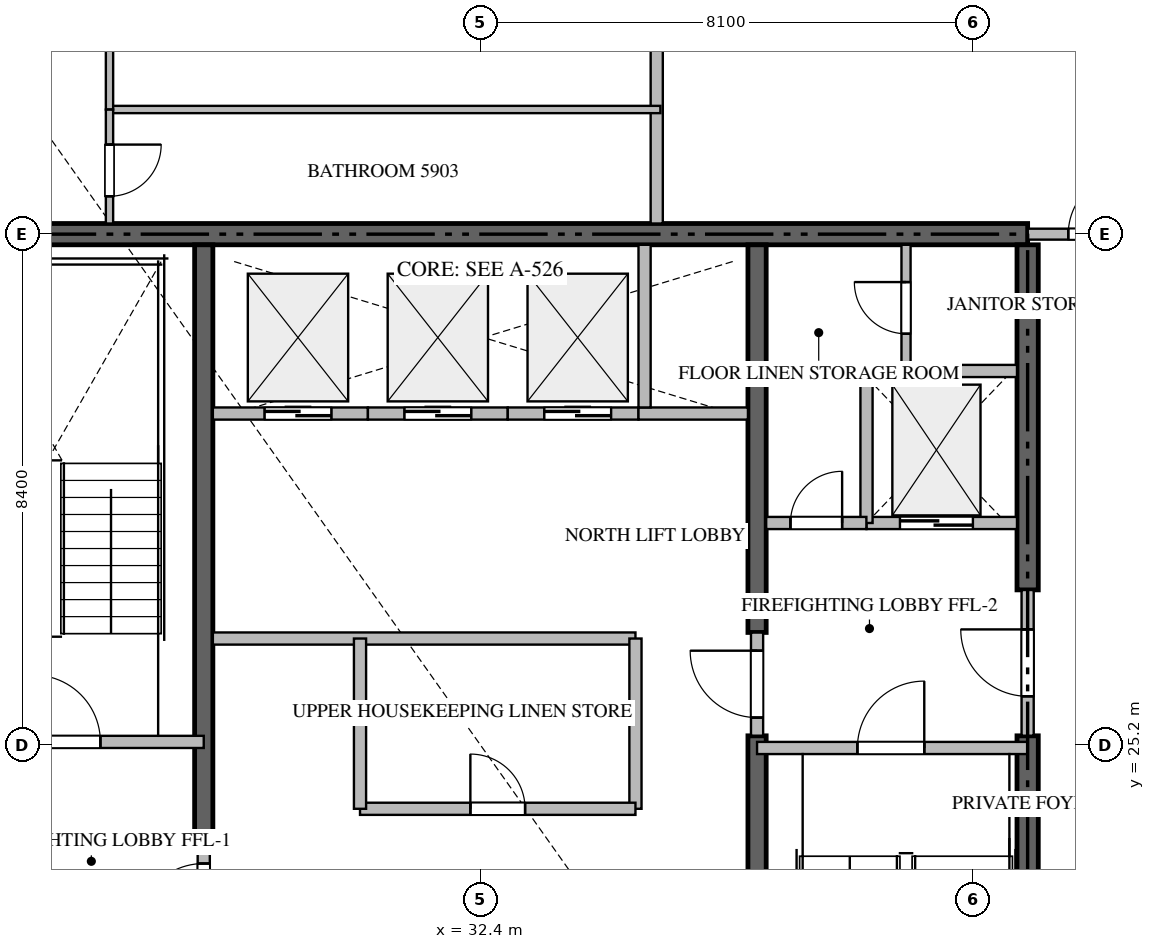
"""IFC4 building model, lengths in metres.
Left out: names, types, materials, properties, quantities, classifications, styles, units other than length and angle.
Written with IfcOpenShell. Run it as: python <this file> out.ifc"""

import sys

from ifc_helpers import new_model, si_unit, direction, frame, frame_2d, origin, place, context, subcontext, project, spatial, rectangle, extrude, source, transform, mapped, element, fill, save


model = new_model("IFC4")
c1 = context("Model", 3, precision=1e-05, world=origin(), true_north=direction((0.0, 1.0)))
c2 = subcontext(c1, "Body", "Model", "MODEL_VIEW")
j1 = project(units=[si_unit("LENGTHUNIT", "METRE"), si_unit("PLANEANGLEUNIT", "RADIAN")], contexts=[c1])
p1 = place(None, origin())
s1 = spatial("IfcSite", under=j1, at=p1, CompositionType="ELEMENT")
p2 = place(p1, origin())
s2 = spatial("IfcBuilding", under=s1, at=p2, CompositionType="ELEMENT")
p3 = place(p2, frame((0.0, 0.0, 237.4)))
s3 = spatial("IfcBuildingStorey", under=s2, at=p3, CompositionType="ELEMENT", Elevation=237.4)
p4 = place(p3, frame((41.4, 33.6, -0.26), z_axis=(0.0, 0.0, 1.0), x_axis=(-1.0, 0.0, 0.0)))
e1 = element("IfcWall", 1, at=p4, inside=s3, PredefinedType="SHEAR", context=c2, shape_type="SweptSolid", body=[
    extrude(rectangle(XDim=18.0, YDim=0.35, at=frame_2d((9.0, 0.0))), origin(), (0.0, 0.0, 1.0), 3.848),
])
p5 = place(p3, frame((41.4, 16.975, -0.26), z_axis=(0.0, 0.0, 1.0), x_axis=(0.0, 1.0, 0.0)))
e2 = element("IfcWall", 2, at=p5, inside=s3, PredefinedType="SHEAR", context=c2, shape_type="SweptSolid", body=[
    extrude(rectangle(XDim=8.375, YDim=0.35, at=frame_2d((4.188, 0.0))), origin(), (0.0, 0.0, 1.0), 3.848),
])
p6 = place(p3, frame((41.4, 27.75, -0.26), z_axis=(0.0, 0.0, 1.0), x_axis=(0.0, 1.0, 0.0)))
e3 = element("IfcWall", 3, at=p6, inside=s3, PredefinedType="SHEAR", context=c2, shape_type="SweptSolid", body=[
    extrude(rectangle(XDim=5.675, YDim=0.35, at=frame_2d((2.837, 0.0))), origin(), (0.0, 0.0, 1.0), 3.848),
])
p7 = place(p3, frame((27.85, 23.55, -0.26), z_axis=(0.0, 0.0, 1.0), x_axis=(0.0, 1.0, 0.0)))
e4 = element("IfcWall", 4, at=p7, inside=s3, PredefinedType="SHEAR", context=c2, shape_type="SweptSolid", body=[
    extrude(rectangle(XDim=9.875, YDim=0.3, at=frame_2d((4.938, 0.0))), origin(), (0.0, 0.0, 1.0), 3.848),
])
p8 = place(p3, frame((36.95, 16.975, -0.26), z_axis=(0.0, 0.0, 1.0), x_axis=(0.0, 1.0, 0.0)))
e5 = element("IfcWall", 5, at=p8, inside=s3, PredefinedType="SHEAR", context=c2, shape_type="SweptSolid", body=[
    extrude(rectangle(XDim=8.375, YDim=0.3, at=frame_2d((4.188, 0.0))), origin(), (0.0, 0.0, 1.0), 3.848),
])
p9 = place(p3, frame((36.95, 27.05, -0.26), z_axis=(0.0, 0.0, 1.0), x_axis=(0.0, 1.0, 0.0)))
e6 = element("IfcWall", 6, at=p9, inside=s3, PredefinedType="SHEAR", context=c2, shape_type="SweptSolid", body=[
    extrude(rectangle(XDim=6.375, YDim=0.3, at=frame_2d((3.188, 0.0))), origin(), (0.0, 0.0, 1.0), 3.848),
])
p10 = place(p3, frame((23.4, 25.25, 0.0), z_axis=(0.0, 0.0, 1.0), x_axis=(1.0, 0.0, 0.0)))
e7 = element("IfcWall", 7, at=p10, inside=s3, PredefinedType="STANDARD", context=c2, shape_type="SweptSolid", body=[
    extrude(rectangle(XDim=4.45, YDim=0.2, at=frame_2d((2.225, 0.0))), origin(), (0.0, 0.0, 1.0), 3.59),
])
p11 = place(p10, frame((1.65, 0.0, 0.0)))
e8 = element("IfcOpeningElement", 8, at=p11, cuts=e7, PredefinedType="OPENING", context=c2, shape_type="SweptSolid", body=[
    extrude(rectangle(XDim=1.1, YDim=2.15, at=frame_2d((0.55, 1.075))), frame((0.0, 0.11, 0.0), z_axis=(0.0, -1.0, 0.0), x_axis=(1.0, 0.0, 0.0)), (0.0, 0.0, 1.0), 0.22),
])
p12 = place(p3, frame((36.95, 25.15, 0.0), z_axis=(0.0, 0.0, 1.0), x_axis=(1.0, 0.0, 0.0)))
e9 = element("IfcWall", 9, at=p12, inside=s3, PredefinedType="STANDARD", context=c2, shape_type="SweptSolid", body=[
    extrude(rectangle(XDim=4.45, YDim=0.2, at=frame_2d((2.225, 0.0))), origin(), (0.0, 0.0, 1.0), 3.59),
])
p13 = place(p12, frame((1.65, 0.0, 0.0)))
e10 = element("IfcOpeningElement", 10, at=p13, cuts=e9, PredefinedType="OPENING", context=c2, shape_type="SweptSolid", body=[
    extrude(rectangle(XDim=1.1, YDim=2.15, at=frame_2d((0.55, 1.075))), frame((0.0, 0.11, 0.0), z_axis=(0.0, -1.0, 0.0), x_axis=(1.0, 0.0, 0.0)), (0.0, 0.0, 1.0), 0.22),
])
p14 = place(p3, frame((38.75, 28.85, 0.0), z_axis=(0.0, 0.0, 1.0), x_axis=(1.0, 0.0, 0.0)))
e11 = element("IfcWall", 11, at=p14, inside=s3, PredefinedType="STANDARD", context=c2, shape_type="SweptSolid", body=[
    extrude(rectangle(XDim=2.475, YDim=0.2, at=frame_2d((1.238, 0.0))), origin(), (0.0, 0.0, 1.0), 3.59),
])
p15 = place(p14, frame((0.55, 0.0, 0.0)))
e12 = element("IfcOpeningElement", 12, at=p15, cuts=e11, PredefinedType="OPENING", context=c2, shape_type="SweptSolid", body=[
    extrude(rectangle(XDim=1.2, YDim=2.2, at=frame_2d((0.6, 1.1))), frame((0.0, 0.11, 0.0), z_axis=(0.0, -1.0, 0.0), x_axis=(1.0, 0.0, 0.0)), (0.0, 0.0, 1.0), 0.22),
])
p16 = place(p3, frame((28.0, 30.65, 0.0), z_axis=(0.0, 0.0, 1.0), x_axis=(1.0, 0.0, 0.0)))
e13 = element("IfcWall", 13, at=p16, inside=s3, PredefinedType="STANDARD", context=c2, shape_type="SweptSolid", body=[
    extrude(rectangle(XDim=2.55, YDim=0.2, at=frame_2d((1.275, 0.0))), origin(), (0.0, 0.0, 1.0), 3.59),
])
p17 = place(p16, frame((0.85, 0.0, 0.0)))
e14 = element("IfcOpeningElement", 14, at=p17, cuts=e13, PredefinedType="OPENING", context=c2, shape_type="SweptSolid", body=[
    extrude(rectangle(XDim=1.1, YDim=2.2, at=frame_2d((0.55, 1.1))), frame((0.0, 0.11, 0.0), z_axis=(0.0, -1.0, 0.0), x_axis=(1.0, 0.0, 0.0)), (0.0, 0.0, 1.0), 0.22),
])
p18 = place(p3, frame((30.55, 30.65, 0.0), z_axis=(0.0, 0.0, 1.0), x_axis=(1.0, 0.0, 0.0)))
e15 = element("IfcWall", 15, at=p18, inside=s3, PredefinedType="STANDARD", context=c2, shape_type="SweptSolid", body=[
    extrude(rectangle(XDim=2.3, YDim=0.2, at=frame_2d((1.15, 0.0))), origin(), (0.0, 0.0, 1.0), 3.59),
])
p19 = place(p18, frame((0.6, 0.0, 0.0)))
e16 = element("IfcOpeningElement", 16, at=p19, cuts=e15, PredefinedType="OPENING", context=c2, shape_type="SweptSolid", body=[
    extrude(rectangle(XDim=1.1, YDim=2.2, at=frame_2d((0.55, 1.1))), frame((0.0, 0.11, 0.0), z_axis=(0.0, -1.0, 0.0), x_axis=(1.0, 0.0, 0.0)), (0.0, 0.0, 1.0), 0.22),
])
p20 = place(p3, frame((32.85, 30.65, 0.0), z_axis=(0.0, 0.0, 1.0), x_axis=(1.0, 0.0, 0.0)))
e17 = element("IfcWall", 17, at=p20, inside=s3, PredefinedType="STANDARD", context=c2, shape_type="SweptSolid", body=[
    extrude(rectangle(XDim=2.15, YDim=0.2, at=frame_2d((1.075, 0.0))), origin(), (0.0, 0.0, 1.0), 3.59),
])
p21 = place(p20, frame((0.6, 0.0, 0.0)))
e18 = element("IfcOpeningElement", 18, at=p21, cuts=e17, PredefinedType="OPENING", context=c2, shape_type="SweptSolid", body=[
    extrude(rectangle(XDim=1.1, YDim=2.2, at=frame_2d((0.55, 1.1))), frame((0.0, 0.11, 0.0), z_axis=(0.0, -1.0, 0.0), x_axis=(1.0, 0.0, 0.0)), (0.0, 0.0, 1.0), 0.22),
])
p22 = place(p3, frame((35.0, 30.65, 0.0), z_axis=(0.0, 0.0, 1.0), x_axis=(1.0, 0.0, 0.0)))
e19 = element("IfcWall", 19, at=p22, inside=s3, PredefinedType="STANDARD", context=c2, shape_type="SweptSolid", body=[
    extrude(rectangle(XDim=1.8, YDim=0.2, at=frame_2d((0.9, 0.0))), origin(), (0.0, 0.0, 1.0), 3.59),
])
p23 = place(p3, frame((35.1, 30.75, 0.0), z_axis=(0.0, 0.0, 1.0), x_axis=(0.0, 1.0, 0.0)))
e20 = element("IfcWall", 20, at=p23, inside=s3, PredefinedType="STANDARD", context=c2, shape_type="SweptSolid", body=[
    extrude(rectangle(XDim=2.675, YDim=0.2, at=frame_2d((1.337, 0.0))), origin(), (0.0, 0.0, 1.0), 3.59),
])
p24 = place(p3, frame((38.75, 28.85, 0.0), z_axis=(0.0, 0.0, 1.0), x_axis=(0.0, 1.0, 0.0)))
e21 = element("IfcWall", 21, at=p24, inside=s3, PredefinedType="STANDARD", context=c2, shape_type="SweptSolid", body=[
    extrude(rectangle(XDim=2.5, YDim=0.2, at=frame_2d((1.25, 0.0))), origin(), (0.0, 0.0, 1.0), 3.59),
])
p25 = place(p3, frame((38.75, 31.35, 0.0), z_axis=(0.0, 0.0, 1.0), x_axis=(1.0, 0.0, 0.0)))
e22 = element("IfcWall", 22, at=p25, inside=s3, PredefinedType="STANDARD", context=c2, shape_type="SweptSolid", body=[
    extrude(rectangle(XDim=2.475, YDim=0.2, at=frame_2d((1.238, 0.0))), origin(), (0.0, 0.0, 1.0), 3.59),
])
p26 = place(p3, frame((37.1, 28.85, 0.0), z_axis=(0.0, 0.0, 1.0), x_axis=(1.0, 0.0, 0.0)))
e23 = element("IfcWall", 23, at=p26, inside=s3, PredefinedType="STANDARD", context=c2, shape_type="SweptSolid", body=[
    extrude(rectangle(XDim=1.648, YDim=0.2, at=frame_2d((0.824, 0.0))), origin(), (0.0, 0.0, 1.0), 3.59),
])
p27 = place(p26, frame((0.399, 0.0, 0.0)))
e24 = element("IfcOpeningElement", 24, at=p27, cuts=e23, PredefinedType="OPENING", context=c2, shape_type="SweptSolid", body=[
    extrude(rectangle(XDim=0.85, YDim=2.1, at=frame_2d((0.425, 1.05))), frame((0.0, 0.11, 0.0), z_axis=(0.0, -1.0, 0.0), x_axis=(1.0, 0.0, 0.0)), (0.0, 0.0, 1.0), 0.22),
])
p28 = place(p3, frame((41.4, 25.352, 0.0), z_axis=(0.0, 0.0, 1.0), x_axis=(0.0, 1.0, 0.0)))
e25 = element("IfcWall", 25, at=p28, inside=s3, PredefinedType="STANDARD", context=c2, shape_type="SweptSolid", body=[
    extrude(rectangle(XDim=2.396, YDim=0.2, at=frame_2d((1.198, 0.0))), origin(), (0.0, 0.0, 1.0), 3.59),
])
p29 = place(p28, frame((0.648, 0.0, 0.0)))
e26 = element("IfcOpeningElement", 26, at=p29, cuts=e25, PredefinedType="OPENING", context=c2, shape_type="SweptSolid", body=[
    extrude(rectangle(XDim=1.1, YDim=2.15, at=frame_2d((0.55, 1.075))), frame((0.0, 0.11, 0.0), z_axis=(0.0, -1.0, 0.0), x_axis=(1.0, 0.0, 0.0)), (0.0, 0.0, 1.0), 0.22),
])
p30 = place(p3, frame((27.85, 21.852, 0.0), z_axis=(0.0, 0.0, 1.0), x_axis=(0.0, 1.0, 0.0)))
e27 = element("IfcWall", 27, at=p30, inside=s3, PredefinedType="STANDARD", context=c2, shape_type="SweptSolid", body=[
    extrude(rectangle(XDim=1.696, YDim=0.2, at=frame_2d((0.848, 0.0))), origin(), (0.0, 0.0, 1.0), 3.59),
])
p31 = place(p30, frame((0.298, 0.0, 0.0)))
e28 = element("IfcOpeningElement", 28, at=p31, cuts=e27, PredefinedType="OPENING", context=c2, shape_type="SweptSolid", body=[
    extrude(rectangle(XDim=1.1, YDim=2.15, at=frame_2d((0.55, 1.075))), frame((0.0, 0.11, 0.0), z_axis=(0.0, -1.0, 0.0), x_axis=(1.0, 0.0, 0.0)), (0.0, 0.0, 1.0), 0.22),
])
p32 = place(p3, frame((36.95, 25.352, 0.0), z_axis=(0.0, 0.0, 1.0), x_axis=(0.0, 1.0, 0.0)))
e29 = element("IfcWall", 29, at=p32, inside=s3, PredefinedType="STANDARD", context=c2, shape_type="SweptSolid", body=[
    extrude(rectangle(XDim=1.696, YDim=0.2, at=frame_2d((0.848, 0.0))), origin(), (0.0, 0.0, 1.0), 3.59),
])
p33 = place(p32, frame((0.298, 0.0, 0.0)))
e30 = element("IfcOpeningElement", 30, at=p33, cuts=e29, PredefinedType="OPENING", context=c2, shape_type="SweptSolid", body=[
    extrude(rectangle(XDim=1.1, YDim=2.15, at=frame_2d((0.55, 1.075))), frame((0.0, 0.11, 0.0), z_axis=(0.0, -1.0, 0.0), x_axis=(1.0, 0.0, 0.0)), (0.0, 0.0, 1.0), 0.22),
])
p34 = place(p3, frame((39.4, 31.35, 0.0), z_axis=(0.0, 0.0, 1.0), x_axis=(0.0, 1.0, 0.0)))
e31 = element("IfcWall", 31, at=p34, inside=s3, PredefinedType="PARTITIONING", context=c2, shape_type="SweptSolid", body=[
    extrude(rectangle(XDim=2.075, YDim=0.15, at=frame_2d((1.038, 0.0))), origin(), (0.0, 0.0, 1.0), 3.59),
])
p35 = place(p34, frame((0.612, 0.0, 0.0)))
e32 = element("IfcOpeningElement", 32, at=p35, cuts=e31, PredefinedType="OPENING", context=c2, shape_type="SweptSolid", body=[
    extrude(rectangle(XDim=0.85, YDim=2.1, at=frame_2d((0.425, 1.05))), frame((0.0, 0.085, 0.0), z_axis=(0.0, -1.0, 0.0), x_axis=(1.0, 0.0, 0.0)), (0.0, 0.0, 1.0), 0.17),
])
p36 = place(p3, frame((28.0, 26.95, 0.0), z_axis=(0.0, 0.0, 1.0), x_axis=(1.0, 0.0, 0.0)))
e33 = element("IfcWall", 33, at=p36, inside=s3, PredefinedType="STANDARD", context=c2, shape_type="SweptSolid", body=[
    extrude(rectangle(XDim=6.95, YDim=0.2, at=frame_2d((3.475, 0.0))), origin(), (0.0, 0.0, 1.0), 3.59),
])
p37 = place(p3, frame((34.95, 24.15, 0.0), z_axis=(0.0, 0.0, 1.0), x_axis=(0.0, 1.0, 0.0)))
e34 = element("IfcWall", 34, at=p37, inside=s3, PredefinedType="STANDARD", context=c2, shape_type="SweptSolid", body=[
    extrude(rectangle(XDim=2.8, YDim=0.2, at=frame_2d((1.4, 0.0))), origin(), (0.0, 0.0, 1.0), 3.59),
])
p38 = place(p3, frame((30.42, 24.15, 0.0), z_axis=(0.0, 0.0, 1.0), x_axis=(1.0, 0.0, 0.0)))
e35 = element("IfcWall", 35, at=p38, inside=s3, PredefinedType="STANDARD", context=c2, shape_type="SweptSolid", body=[
    extrude(rectangle(XDim=4.53, YDim=0.2, at=frame_2d((2.265, 0.0))), origin(), (0.0, 0.0, 1.0), 3.59),
])
p39 = place(p38, frame((1.815, 0.0, 0.0)))
e36 = element("IfcOpeningElement", 36, at=p39, cuts=e35, PredefinedType="OPENING", context=c2, shape_type="SweptSolid", body=[
    extrude(rectangle(XDim=0.9, YDim=2.1, at=frame_2d((0.45, 1.05))), frame((0.0, 0.11, 0.0), z_axis=(0.0, -1.0, 0.0), x_axis=(1.0, 0.0, 0.0)), (0.0, 0.0, 1.0), 0.22),
])
p40 = place(p3, frame((30.42, 24.15, 0.0), z_axis=(0.0, 0.0, 1.0), x_axis=(0.0, 1.0, 0.0)))
e37 = element("IfcWall", 37, at=p40, inside=s3, PredefinedType="STANDARD", context=c2, shape_type="SweptSolid", body=[
    extrude(rectangle(XDim=2.8, YDim=0.2, at=frame_2d((1.4, 0.0))), origin(), (0.0, 0.0, 1.0), 3.59),
])
p41 = place(p3, frame((35.3, 33.775, 0.0), z_axis=(0.0, 0.0, 1.0), x_axis=(0.0, 1.0, 0.0)))
e38 = element("IfcWall", 38, at=p41, inside=s3, PredefinedType="PARTITIONING", context=c2, shape_type="SweptSolid", body=[
    extrude(rectangle(XDim=15.343, YDim=0.2, at=frame_2d((7.671, 0.0))), origin(), (0.0, 0.0, 1.0), 3.59),
])
p42 = place(p3, frame((41.402, 33.6, 0.0), z_axis=(0.0, 0.0, 1.0), x_axis=(1.0, 0.0, 0.0)))
e39 = element("IfcWall", 39, at=p42, inside=s3, PredefinedType="PARTITIONING", context=c2, shape_type="SweptSolid", body=[
    extrude(rectangle(XDim=2.496, YDim=0.18, at=frame_2d((1.248, 0.0))), origin(), (0.0, 0.0, 1.0), 3.59),
])
p43 = place(p42, frame((0.666, 0.0, 0.0)))
e40 = element("IfcOpeningElement", 40, at=p43, cuts=e39, PredefinedType="OPENING", context=c2, shape_type="SweptSolid", body=[
    extrude(rectangle(XDim=1.0, YDim=2.15, at=frame_2d((0.5, 1.075))), frame((0.0, 0.1, 0.0), z_axis=(0.0, -1.0, 0.0), x_axis=(1.0, 0.0, 0.0)), (0.0, 0.0, 1.0), 0.2),
])
p44 = place(p3, frame((26.3, 35.65, 0.0), z_axis=(0.0, 0.0, 1.0), x_axis=(1.0, 0.0, 0.0)))
e41 = element("IfcWall", 41, at=p44, inside=s3, PredefinedType="PARTITIONING", context=c2, shape_type="SweptSolid", body=[
    extrude(rectangle(XDim=9.06, YDim=0.12, at=frame_2d((4.53, 0.0))), origin(), (0.0, 0.0, 1.0), 3.59),
])
p45 = place(p3, frame((26.3, 45.234, 0.0), z_axis=(0.0, 0.0, 1.0), x_axis=(0.0, -1.0, 0.0)))
e42 = element("IfcWall", 42, at=p45, inside=s3, PredefinedType="PARTITIONING", context=c2, shape_type="SweptSolid", body=[
    extrude(rectangle(XDim=9.584, YDim=0.12, at=frame_2d((4.792, 0.0))), origin(), (0.0, 0.0, 1.0), 3.59),
])
p46 = place(p45, frame((4.367, 0.0, 0.0)))
e43 = element("IfcOpeningElement", 43, at=p46, cuts=e42, PredefinedType="OPENING", context=c2, shape_type="SweptSolid", body=[
    extrude(rectangle(XDim=0.85, YDim=2.1, at=frame_2d((0.425, 1.05))), frame((0.0, 0.07, 0.0), z_axis=(0.0, -1.0, 0.0), x_axis=(1.0, 0.0, 0.0)), (0.0, 0.0, 1.0), 0.14),
])
p47 = place(p3, frame((26.3, 35.648, 0.0), z_axis=(0.0, 0.0, 1.0), x_axis=(0.0, -1.0, 0.0)))
e44 = element("IfcWall", 44, at=p47, inside=s3, PredefinedType="PARTITIONING", context=c2, shape_type="SweptSolid", body=[
    extrude(rectangle(XDim=1.873, YDim=0.12, at=frame_2d((0.937, 0.0))), origin(), (0.0, 0.0, 1.0), 3.59),
])
p48 = place(p47, frame((0.575, 0.0, 0.0)))
e45 = element("IfcOpeningElement", 45, at=p48, cuts=e44, PredefinedType="OPENING", context=c2, shape_type="SweptSolid", body=[
    extrude(rectangle(XDim=0.85, YDim=2.1, at=frame_2d((0.425, 1.05))), frame((0.0, 0.07, 0.0), z_axis=(0.0, -1.0, 0.0), x_axis=(1.0, 0.0, 0.0)), (0.0, 0.0, 1.0), 0.14),
])
m1 = source(origin(), c2, "Body", "SweptSolid", [
    extrude(rectangle(XDim=1.1, YDim=2.15, at=frame_2d((0.55, 1.075))), frame((0.0, 0.025, 0.0), z_axis=(0.0, -1.0, 0.0), x_axis=(1.0, 0.0, 0.0)), (0.0, 0.0, 1.0), 0.05),
])
p49 = place(p11, origin())
e46 = element("IfcDoor", 46, at=p49, inside=s3, OperationType="SINGLE_SWING_LEFT", PredefinedType="DOOR", context=c2, shape_type="MappedRepresentation", body=[
    mapped(m1, transform((0.0, 0.0, 0.0), scale=1.0)),
])
fill(e8, e46)
p50 = place(p13, origin())
e47 = element("IfcDoor", 47, at=p50, inside=s3, OperationType="SINGLE_SWING_RIGHT", PredefinedType="DOOR", context=c2, shape_type="MappedRepresentation", body=[
    mapped(m1, transform((0.0, 0.0, 0.0), scale=1.0)),
])
fill(e10, e47)
m2 = source(origin(), c2, "Body", "SweptSolid", [
    extrude(rectangle(XDim=1.2, YDim=2.2, at=frame_2d((0.6, 1.1))), frame((0.0, 0.025, 0.0), z_axis=(0.0, -1.0, 0.0), x_axis=(1.0, 0.0, 0.0)), (0.0, 0.0, 1.0), 0.05),
])
p51 = place(p15, origin())
e48 = element("IfcDoor", 48, at=p51, inside=s3, OperationType="DOUBLE_DOOR_SLIDING", PredefinedType="DOOR", context=c2, shape_type="MappedRepresentation", body=[
    mapped(m2, transform((0.0, 0.0, 0.0), scale=1.0)),
])
fill(e12, e48)
m3 = source(origin(), c2, "Body", "SweptSolid", [
    extrude(rectangle(XDim=1.1, YDim=2.2, at=frame_2d((0.55, 1.1))), frame((0.0, 0.025, 0.0), z_axis=(0.0, -1.0, 0.0), x_axis=(1.0, 0.0, 0.0)), (0.0, 0.0, 1.0), 0.05),
])
p52 = place(p17, origin())
e49 = element("IfcDoor", 49, at=p52, inside=s3, OperationType="DOUBLE_DOOR_SLIDING", PredefinedType="DOOR", context=c2, shape_type="MappedRepresentation", body=[
    mapped(m3, transform((0.0, 0.0, 0.0), scale=1.0)),
])
fill(e14, e49)
p53 = place(p19, origin())
e50 = element("IfcDoor", 50, at=p53, inside=s3, OperationType="DOUBLE_DOOR_SLIDING", PredefinedType="DOOR", context=c2, shape_type="MappedRepresentation", body=[
    mapped(m3, transform((0.0, 0.0, 0.0), scale=1.0)),
])
fill(e16, e50)
p54 = place(p21, origin())
e51 = element("IfcDoor", 51, at=p54, inside=s3, OperationType="DOUBLE_DOOR_SLIDING", PredefinedType="DOOR", context=c2, shape_type="MappedRepresentation", body=[
    mapped(m3, transform((0.0, 0.0, 0.0), scale=1.0)),
])
fill(e18, e51)
m4 = source(origin(), c2, "Body", "SweptSolid", [
    extrude(rectangle(XDim=0.85, YDim=2.1, at=frame_2d((0.425, 1.05))), frame((0.0, 0.025, 0.0), z_axis=(0.0, -1.0, 0.0), x_axis=(1.0, 0.0, 0.0)), (0.0, 0.0, 1.0), 0.05),
])
p55 = place(p27, origin())
e52 = element("IfcDoor", 52, at=p55, inside=s3, OperationType="SINGLE_SWING_RIGHT", PredefinedType="DOOR", context=c2, shape_type="MappedRepresentation", body=[
    mapped(m4, transform((0.0, 0.0, 0.0), scale=1.0)),
])
fill(e24, e52)
p56 = place(p29, origin())
e53 = element("IfcDoor", 53, at=p56, inside=s3, OperationType="SINGLE_SWING_RIGHT", PredefinedType="DOOR", context=c2, shape_type="MappedRepresentation", body=[
    mapped(m1, transform((0.0, 0.0, 0.0), scale=1.0)),
])
fill(e26, e53)
p57 = place(p31, origin())
e54 = element("IfcDoor", 54, at=p57, inside=s3, OperationType="SINGLE_SWING_LEFT", PredefinedType="DOOR", context=c2, shape_type="MappedRepresentation", body=[
    mapped(m1, transform((0.0, 0.0, 0.0), scale=1.0)),
])
fill(e28, e54)
p58 = place(p33, origin())
e55 = element("IfcDoor", 55, at=p58, inside=s3, OperationType="SINGLE_SWING_RIGHT", PredefinedType="DOOR", context=c2, shape_type="MappedRepresentation", body=[
    mapped(m1, transform((0.0, 0.0, 0.0), scale=1.0)),
])
fill(e30, e55)
p59 = place(p35, origin())
e56 = element("IfcDoor", 56, at=p59, inside=s3, OperationType="SINGLE_SWING_RIGHT", PredefinedType="DOOR", context=c2, shape_type="MappedRepresentation", body=[
    mapped(m4, transform((0.0, 0.0, 0.0), scale=1.0)),
])
fill(e32, e56)
m5 = source(origin(), c2, "Body", "SweptSolid", [
    extrude(rectangle(XDim=0.9, YDim=2.1, at=frame_2d((0.45, 1.05))), frame((0.0, 0.025, 0.0), z_axis=(0.0, -1.0, 0.0), x_axis=(1.0, 0.0, 0.0)), (0.0, 0.0, 1.0), 0.05),
])
p60 = place(p39, origin())
e57 = element("IfcDoor", 57, at=p60, inside=s3, OperationType="SINGLE_SWING_LEFT", PredefinedType="DOOR", context=c2, shape_type="MappedRepresentation", body=[
    mapped(m5, transform((0.0, 0.0, 0.0), scale=1.0)),
])
fill(e36, e57)
m6 = source(origin(), c2, "Body", "SweptSolid", [
    extrude(rectangle(XDim=1.0, YDim=2.15, at=frame_2d((0.5, 1.075))), frame((0.0, 0.025, 0.0), z_axis=(0.0, -1.0, 0.0), x_axis=(1.0, 0.0, 0.0)), (0.0, 0.0, 1.0), 0.05),
])
p61 = place(p43, origin())
e58 = element("IfcDoor", 58, at=p61, inside=s3, OperationType="SINGLE_SWING_RIGHT", PredefinedType="DOOR", context=c2, shape_type="MappedRepresentation", body=[
    mapped(m6, transform((0.0, 0.0, 0.0), scale=1.0)),
])
fill(e40, e58)
p62 = place(p48, origin())
e59 = element("IfcDoor", 59, at=p62, inside=s3, OperationType="SINGLE_SWING_LEFT", PredefinedType="DOOR", context=c2, shape_type="MappedRepresentation", body=[
    mapped(m4, transform((0.0, 0.0, 0.0), scale=1.0)),
])
fill(e45, e59)
save(model, sys.argv[1])
